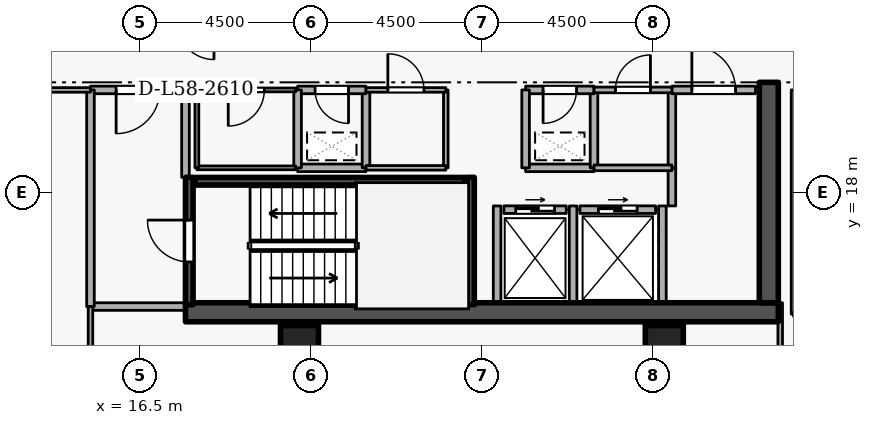
"""IFC4 building model, lengths in metres.
Left out: names, types, materials, properties, quantities, classifications, styles, units other than length and angle.
Written with IfcOpenShell. Run it as: python <this file> out.ifc"""

import sys

from ifc_helpers import new_model, si_unit, direction, frame, frame_2d, origin, origin_2d, place, context, subcontext, project, spatial, rectangle, extrude, element, fill, save


model = new_model("IFC4")
c1 = context("Model", 3, precision=1e-05, world=origin(), true_north=direction((0.0, 1.0)))
c2 = subcontext(c1, "Body", "Model", "MODEL_VIEW")
j1 = project(units=[si_unit("LENGTHUNIT", "METRE"), si_unit("PLANEANGLEUNIT", "RADIAN")], contexts=[c1])
p1 = place(None, origin())
s1 = spatial("IfcSite", under=j1, at=p1, CompositionType="ELEMENT")
p2 = place(p1, origin())
s2 = spatial("IfcBuilding", under=s1, at=p2, CompositionType="ELEMENT")
p3 = place(p2, frame((0.0, 0.0, 218.1)))
s3 = spatial("IfcBuildingStorey", under=s2, at=p3, CompositionType="ELEMENT", Elevation=218.1)
p4 = place(p3, frame((17.7, 14.85, 0.0), z_axis=(0.0, 0.0, 1.0), x_axis=(1.0, 0.0, 0.0)))
e1 = element("IfcWall", 1, at=p4, inside=s3, PredefinedType="SHEAR", context=c2, shape_type="SweptSolid", body=[
    extrude(rectangle(XDim=15.6, YDim=0.5, at=frame_2d((7.8, 0.0))), origin(), (0.0, 0.0, 1.0), 3.6),
])
p5 = place(p3, frame((33.05, 15.1, 0.0), z_axis=(0.0, 0.0, 1.0), x_axis=(0.0, 1.0, 0.0)))
e2 = element("IfcWall", 2, at=p5, inside=s3, PredefinedType="SHEAR", context=c2, shape_type="SweptSolid", body=[
    extrude(rectangle(XDim=5.8, YDim=0.5, at=frame_2d((2.9, 0.0))), origin(), (0.0, 0.0, 1.0), 3.6),
])
for number, where, z_axis, x_axis in (
    (3, (20.7, 14.0, 0.0), (0.0, 0.0, 1.0), (1.0, 0.0, 0.0)),
    (4, (30.3, 14.0, 0.0), (0.0, 0.0, 1.0), (1.0, 0.0, 0.0)),
):
    element("IfcColumn", number, at=place(p3, frame(where, z_axis=z_axis, x_axis=x_axis)), inside=s3, PredefinedType="COLUMN", context=c2, shape_type="SweptSolid", body=[
        extrude(rectangle(XDim=1.0, YDim=1.0, at=origin_2d()), origin(), (0.0, 0.0, 1.0), 3.6),
    ])
p6 = place(p3, frame((26.08, 17.55, 0.0), z_axis=(0.0, 0.0, 1.0), x_axis=(1.0, 0.0, 0.0)))
e5 = element("IfcWall", 5, at=p6, inside=s3, PredefinedType="STANDARD", context=c2, shape_type="SweptSolid", body=[
    extrude(rectangle(XDim=1.64, YDim=0.2, at=frame_2d((0.82, 0.0))), origin(), (0.0, 0.0, 1.0), 3.26),
])
p7 = place(p6, frame((0.31, 0.0, 0.0)))
e6 = element("IfcOpeningElement", 6, at=p7, cuts=e5, PredefinedType="OPENING", context=c2, shape_type="SweptSolid", body=[
    extrude(rectangle(XDim=1.02, YDim=2.06, at=frame_2d((0.51, 1.03))), frame((0.0, 0.11, 0.0), z_axis=(0.0, -1.0, 0.0), x_axis=(1.0, 0.0, 0.0)), (0.0, 0.0, 1.0), 0.22),
])
p8 = place(p3, frame((28.08, 17.55, 0.0), z_axis=(0.0, 0.0, 1.0), x_axis=(1.0, 0.0, 0.0)))
e7 = element("IfcWall", 7, at=p8, inside=s3, PredefinedType="STANDARD", context=c2, shape_type="SweptSolid", body=[
    extrude(rectangle(XDim=1.99, YDim=0.2, at=frame_2d((0.995, 0.0))), origin(), (0.0, 0.0, 1.0), 3.26),
])
p9 = place(p8, frame((0.485, 0.0, 0.0)))
e8 = element("IfcOpeningElement", 8, at=p9, cuts=e7, PredefinedType="OPENING", context=c2, shape_type="SweptSolid", body=[
    extrude(rectangle(XDim=1.02, YDim=2.06, at=frame_2d((0.51, 1.03))), frame((0.0, 0.11, 0.0), z_axis=(0.0, -1.0, 0.0), x_axis=(1.0, 0.0, 0.0)), (0.0, 0.0, 1.0), 0.22),
])
for number, where, z_axis, x_axis in (
    (9, (27.9, 15.112, 0.0), (0.0, 0.0, 1.0), (0.0, 1.0, 0.0)),
    (10, (25.9, 15.112, 0.0), (0.0, 0.0, 1.0), (0.0, 1.0, 0.0)),
    (11, (30.25, 15.112, 0.0), (0.0, 0.0, 1.0), (0.0, 1.0, 0.0)),
):
    element("IfcWall", number, at=place(p3, frame(where, z_axis=z_axis, x_axis=x_axis)), inside=s3, PredefinedType="STANDARD", context=c2, shape_type="SweptSolid", body=[
        extrude(rectangle(XDim=2.536, YDim=0.2, at=frame_2d((1.268, 0.0))), origin(), (0.0, 0.0, 1.0), 3.26),
    ])
p10 = place(p3, frame((17.8, 15.05, 0.0), z_axis=(0.0, 0.0, 1.0), x_axis=(0.0, 1.0, 0.0)))
e12 = element("IfcWall", 12, at=p10, inside=s3, PredefinedType="SHEAR", context=c2, shape_type="SweptSolid", body=[
    extrude(rectangle(XDim=3.35, YDim=0.2, at=frame_2d((1.675, 0.0))), origin(), (0.0, 0.0, 1.0), 3.6),
])
p11 = place(p10, frame((1.125, 0.0, 0.0)))
e13 = element("IfcOpeningElement", 13, at=p11, cuts=e12, PredefinedType="OPENING", context=c2, shape_type="SweptSolid", body=[
    extrude(rectangle(XDim=1.1, YDim=2.1, at=frame_2d((0.55, 1.05))), frame((0.0, 0.11, 0.0), z_axis=(0.0, -1.0, 0.0), x_axis=(1.0, 0.0, 0.0)), (0.0, 0.0, 1.0), 0.22),
])
p12 = place(p3, frame((25.2, 18.4, 0.0), z_axis=(0.0, 0.0, 1.0), x_axis=(0.0, -1.0, 0.0)))
e14 = element("IfcWall", 14, at=p12, inside=s3, PredefinedType="SHEAR", context=c2, shape_type="SweptSolid", body=[
    extrude(rectangle(XDim=3.35, YDim=0.2, at=frame_2d((1.675, 0.0))), origin(), (0.0, 0.0, 1.0), 3.6),
])
p13 = place(p3, frame((25.05, 18.297, 0.0), z_axis=(0.0, 0.0, 1.0), x_axis=(-1.0, 0.0, 0.0)))
e15 = element("IfcWall", 15, at=p13, inside=s3, PredefinedType="SHEAR", context=c2, shape_type="SweptSolid", body=[
    extrude(rectangle(XDim=7.1, YDim=0.2, at=frame_2d((3.55, 0.0))), origin(), (0.0, 0.0, 1.0), 3.6),
])
p14 = place(p3, frame((15.2, 15.0, 0.0), z_axis=(0.0, 0.0, 1.0), x_axis=(1.0, 0.0, 0.0)))
e16 = element("IfcWall", 16, at=p14, inside=s3, PredefinedType="STANDARD", context=c2, shape_type="SweptSolid", body=[
    extrude(rectangle(XDim=2.5, YDim=0.2, at=frame_2d((1.25, 0.0))), origin(), (0.0, 0.0, 1.0), 3.26),
])
p15 = place(p3, frame((17.7, 18.4, 0.0), z_axis=(0.0, 0.0, 1.0), x_axis=(0.0, 1.0, 0.0)))
e17 = element("IfcWall", 17, at=p15, inside=s3, PredefinedType="STANDARD", context=c2, shape_type="SweptSolid", body=[
    extrude(rectangle(XDim=2.3, YDim=0.2, at=frame_2d((1.15, 0.0))), origin(), (0.0, 0.0, 1.0), 2.465),
])
p16 = place(p3, frame((17.7, 20.7, 0.0), z_axis=(0.0, 0.0, 1.0), x_axis=(-1.0, 0.0, 0.0)))
e18 = element("IfcWall", 18, at=p16, inside=s3, PredefinedType="STANDARD", context=c2, shape_type="SweptSolid", body=[
    extrude(rectangle(XDim=2.5, YDim=0.2, at=frame_2d((1.25, 0.0))), origin(), (0.0, 0.0, 1.0), 3.26),
])
p17 = place(p16, frame((0.675, 0.0, 0.0)))
e19 = element("IfcOpeningElement", 19, at=p17, cuts=e18, PredefinedType="OPENING", context=c2, shape_type="SweptSolid", body=[
    extrude(rectangle(XDim=1.15, YDim=2.1, at=frame_2d((0.575, 1.05))), frame((0.0, 0.11, 0.0), z_axis=(0.0, -1.0, 0.0), x_axis=(1.0, 0.0, 0.0)), (0.0, 0.0, 1.0), 0.22),
])
p18 = place(p3, frame((15.2, 20.7, 0.0), z_axis=(0.0, 0.0, 1.0), x_axis=(0.0, -1.0, 0.0)))
e20 = element("IfcWall", 20, at=p18, inside=s3, PredefinedType="STANDARD", context=c2, shape_type="SweptSolid", body=[
    extrude(rectangle(XDim=5.7, YDim=0.2, at=frame_2d((2.85, 0.0))), origin(), (0.0, 0.0, 1.0), 3.26),
])
p19 = place(p3, frame((26.65, 18.65, 0.0), z_axis=(0.0, 0.0, 1.0), x_axis=(1.0, 0.0, 0.0)))
e21 = element("IfcWall", 21, at=p19, inside=s3, PredefinedType="STANDARD", context=c2, shape_type="SweptSolid", body=[
    extrude(rectangle(XDim=1.8, YDim=0.2, at=frame_2d((0.9, 0.0))), origin(), (0.0, 0.0, 1.0), 3.26),
])
p20 = place(p3, frame((28.45, 18.65, 0.0), z_axis=(0.0, 0.0, 1.0), x_axis=(0.0, 1.0, 0.0)))
e22 = element("IfcWall", 22, at=p20, inside=s3, PredefinedType="STANDARD", context=c2, shape_type="SweptSolid", body=[
    extrude(rectangle(XDim=2.05, YDim=0.2, at=frame_2d((1.025, 0.0))), origin(), (0.0, 0.0, 1.0), 3.26),
])
p21 = place(p3, frame((28.45, 20.7, 0.0), z_axis=(0.0, 0.0, 1.0), x_axis=(-1.0, 0.0, 0.0)))
e23 = element("IfcWall", 23, at=p21, inside=s3, PredefinedType="STANDARD", context=c2, shape_type="SweptSolid", body=[
    extrude(rectangle(XDim=1.8, YDim=0.2, at=frame_2d((0.9, 0.0))), origin(), (0.0, 0.0, 1.0), 3.26),
])
p22 = place(p21, frame((0.46, 0.0, 0.0)))
e24 = element("IfcOpeningElement", 24, at=p22, cuts=e23, PredefinedType="OPENING", context=c2, shape_type="SweptSolid", body=[
    extrude(rectangle(XDim=0.88, YDim=2.04, at=frame_2d((0.44, 1.02))), frame((0.0, 0.11, 0.0), z_axis=(0.0, -1.0, 0.0), x_axis=(1.0, 0.0, 0.0)), (0.0, 0.0, 1.0), 0.22),
])
p23 = place(p3, frame((26.65, 20.7, 0.0), z_axis=(0.0, 0.0, 1.0), x_axis=(0.0, -1.0, 0.0)))
e25 = element("IfcWall", 25, at=p23, inside=s3, PredefinedType="STANDARD", context=c2, shape_type="SweptSolid", body=[
    extrude(rectangle(XDim=2.05, YDim=0.2, at=frame_2d((1.025, 0.0))), origin(), (0.0, 0.0, 1.0), 3.26),
])
p24 = place(p3, frame((20.65, 18.65, 0.0), z_axis=(0.0, 0.0, 1.0), x_axis=(1.0, 0.0, 0.0)))
e26 = element("IfcWall", 26, at=p24, inside=s3, PredefinedType="STANDARD", context=c2, shape_type="SweptSolid", body=[
    extrude(rectangle(XDim=1.8, YDim=0.2, at=frame_2d((0.9, 0.0))), origin(), (0.0, 0.0, 1.0), 3.26),
])
p25 = place(p3, frame((22.45, 18.65, 0.0), z_axis=(0.0, 0.0, 1.0), x_axis=(0.0, 1.0, 0.0)))
e27 = element("IfcWall", 27, at=p25, inside=s3, PredefinedType="STANDARD", context=c2, shape_type="SweptSolid", body=[
    extrude(rectangle(XDim=2.05, YDim=0.2, at=frame_2d((1.025, 0.0))), origin(), (0.0, 0.0, 1.0), 3.26),
])
p26 = place(p3, frame((22.45, 20.7, 0.0), z_axis=(0.0, 0.0, 1.0), x_axis=(-1.0, 0.0, 0.0)))
e28 = element("IfcWall", 28, at=p26, inside=s3, PredefinedType="STANDARD", context=c2, shape_type="SweptSolid", body=[
    extrude(rectangle(XDim=1.8, YDim=0.2, at=frame_2d((0.9, 0.0))), origin(), (0.0, 0.0, 1.0), 3.26),
])
p27 = place(p26, frame((0.46, 0.0, 0.0)))
e29 = element("IfcOpeningElement", 29, at=p27, cuts=e28, PredefinedType="OPENING", context=c2, shape_type="SweptSolid", body=[
    extrude(rectangle(XDim=0.88, YDim=2.04, at=frame_2d((0.44, 1.02))), frame((0.0, 0.11, 0.0), z_axis=(0.0, -1.0, 0.0), x_axis=(1.0, 0.0, 0.0)), (0.0, 0.0, 1.0), 0.22),
])
p28 = place(p3, frame((20.65, 20.7, 0.0), z_axis=(0.0, 0.0, 1.0), x_axis=(0.0, -1.0, 0.0)))
e30 = element("IfcWall", 30, at=p28, inside=s3, PredefinedType="STANDARD", context=c2, shape_type="SweptSolid", body=[
    extrude(rectangle(XDim=2.05, YDim=0.2, at=frame_2d((1.025, 0.0))), origin(), (0.0, 0.0, 1.0), 3.26),
])
p29 = place(p3, frame((30.5, 17.648, 0.0), z_axis=(0.0, 0.0, 1.0), x_axis=(0.0, 1.0, 0.0)))
e31 = element("IfcWall", 31, at=p29, inside=s3, PredefinedType="STANDARD", context=c2, shape_type="SweptSolid", body=[
    extrude(rectangle(XDim=1.002, YDim=0.2, at=frame_2d((0.501, 0.0))), origin(), (0.0, 0.0, 1.0), 3.26),
])
p30 = place(p3, frame((30.5, 18.65, 0.0), z_axis=(0.0, 0.0, 1.0), x_axis=(0.0, 1.0, 0.0)))
e32 = element("IfcWall", 32, at=p30, inside=s3, PredefinedType="STANDARD", context=c2, shape_type="SweptSolid", body=[
    extrude(rectangle(XDim=2.05, YDim=0.2, at=frame_2d((1.025, 0.0))), origin(), (0.0, 0.0, 1.0), 3.26),
])
p31 = place(p3, frame((30.5, 20.7, 0.0), z_axis=(0.0, 0.0, 1.0), x_axis=(1.0, 0.0, 0.0)))
e33 = element("IfcWall", 33, at=p31, inside=s3, PredefinedType="STANDARD", context=c2, shape_type="SweptSolid", body=[
    extrude(rectangle(XDim=2.2, YDim=0.2, at=frame_2d((1.1, 0.0))), origin(), (0.0, 0.0, 1.0), 3.26),
])
p32 = place(p31, frame((0.525, 0.0, 0.0)))
e34 = element("IfcOpeningElement", 34, at=p32, cuts=e33, PredefinedType="OPENING", context=c2, shape_type="SweptSolid", body=[
    extrude(rectangle(XDim=1.15, YDim=2.1, at=frame_2d((0.575, 1.05))), frame((0.0, 0.11, 0.0), z_axis=(0.0, -1.0, 0.0), x_axis=(1.0, 0.0, 0.0)), (0.0, 0.0, 1.0), 0.22),
])
p33 = place(p3, frame((18.0, 18.65, 0.0), z_axis=(0.0, 0.0, 1.0), x_axis=(1.0, 0.0, 0.0)))
e35 = element("IfcWall", 35, at=p33, inside=s3, PredefinedType="PARTITIONING", context=c2, shape_type="SweptSolid", body=[
    extrude(rectangle(XDim=2.6, YDim=0.1, at=frame_2d((1.3, 0.0))), origin(), (0.0, 0.0, 1.0), 3.26),
])
p34 = place(p3, frame((20.6, 20.7, 0.0), z_axis=(0.0, 0.0, 1.0), x_axis=(-1.0, 0.0, 0.0)))
e36 = element("IfcWall", 36, at=p34, inside=s3, PredefinedType="PARTITIONING", context=c2, shape_type="SweptSolid", body=[
    extrude(rectangle(XDim=2.6, YDim=0.1, at=frame_2d((1.3, 0.0))), origin(), (0.0, 0.0, 1.0), 3.26),
])
p35 = place(p34, frame((0.825, 0.0, 0.0)))
e37 = element("IfcOpeningElement", 37, at=p35, cuts=e36, PredefinedType="OPENING", context=c2, shape_type="SweptSolid", body=[
    extrude(rectangle(XDim=0.95, YDim=2.1, at=frame_2d((0.475, 1.05))), frame((0.0, 0.06, 0.0), z_axis=(0.0, -1.0, 0.0), x_axis=(1.0, 0.0, 0.0)), (0.0, 0.0, 1.0), 0.12),
])
p36 = place(p3, frame((18.0, 20.7, 0.0), z_axis=(0.0, 0.0, 1.0), x_axis=(0.0, -1.0, 0.0)))
e38 = element("IfcWall", 38, at=p36, inside=s3, PredefinedType="PARTITIONING", context=c2, shape_type="SweptSolid", body=[
    extrude(rectangle(XDim=2.05, YDim=0.1, at=frame_2d((1.025, 0.0))), origin(), (0.0, 0.0, 1.0), 2.465),
])
p37 = place(p3, frame((24.55, 20.7, 0.0), z_axis=(0.0, 0.0, 1.0), x_axis=(0.0, -1.0, 0.0)))
e39 = element("IfcWall", 39, at=p37, inside=s3, PredefinedType="PARTITIONING", context=c2, shape_type="SweptSolid", body=[
    extrude(rectangle(XDim=2.05, YDim=0.12, at=frame_2d((1.025, 0.0))), origin(), (0.0, 0.0, 1.0), 3.26),
])
p38 = place(p3, frame((24.55, 18.65, 0.0), z_axis=(0.0, 0.0, 1.0), x_axis=(-1.0, 0.0, 0.0)))
e40 = element("IfcWall", 40, at=p38, inside=s3, PredefinedType="PARTITIONING", context=c2, shape_type="SweptSolid", body=[
    extrude(rectangle(XDim=2.1, YDim=0.12, at=frame_2d((1.05, 0.0))), origin(), (0.0, 0.0, 1.0), 3.26),
])
p39 = place(p3, frame((22.45, 20.7, 0.0), z_axis=(0.0, 0.0, 1.0), x_axis=(1.0, 0.0, 0.0)))
e41 = element("IfcWall", 41, at=p39, inside=s3, PredefinedType="PARTITIONING", context=c2, shape_type="SweptSolid", body=[
    extrude(rectangle(XDim=2.1, YDim=0.12, at=frame_2d((1.05, 0.0))), origin(), (0.0, 0.0, 1.0), 3.26),
])
p40 = place(p39, frame((0.575, 0.0, 0.0)))
e42 = element("IfcOpeningElement", 42, at=p40, cuts=e41, PredefinedType="OPENING", context=c2, shape_type="SweptSolid", body=[
    extrude(rectangle(XDim=0.95, YDim=2.1, at=frame_2d((0.475, 1.05))), frame((0.0, 0.07, 0.0), z_axis=(0.0, -1.0, 0.0), x_axis=(1.0, 0.0, 0.0)), (0.0, 0.0, 1.0), 0.14),
])
p41 = place(p3, frame((30.5, 18.65, 0.0), z_axis=(0.0, 0.0, 1.0), x_axis=(-1.0, 0.0, 0.0)))
e43 = element("IfcWall", 43, at=p41, inside=s3, PredefinedType="PARTITIONING", context=c2, shape_type="SweptSolid", body=[
    extrude(rectangle(XDim=2.05, YDim=0.15, at=frame_2d((1.025, 0.0))), origin(), (0.0, 0.0, 1.0), 3.26),
])
p42 = place(p3, frame((28.45, 20.7, 0.0), z_axis=(0.0, 0.0, 1.0), x_axis=(1.0, 0.0, 0.0)))
e44 = element("IfcWall", 44, at=p42, inside=s3, PredefinedType="PARTITIONING", context=c2, shape_type="SweptSolid", body=[
    extrude(rectangle(XDim=2.05, YDim=0.15, at=frame_2d((1.025, 0.0))), origin(), (0.0, 0.0, 1.0), 3.26),
])
p43 = place(p42, frame((0.565, 0.0, 0.0)))
e45 = element("IfcOpeningElement", 45, at=p43, cuts=e44, PredefinedType="OPENING", context=c2, shape_type="SweptSolid", body=[
    extrude(rectangle(XDim=0.92, YDim=2.08, at=frame_2d((0.46, 1.04))), frame((0.0, 0.085, 0.0), z_axis=(0.0, -1.0, 0.0), x_axis=(1.0, 0.0, 0.0)), (0.0, 0.0, 1.0), 0.17),
])
p44 = place(p3, frame((33.7, 20.7, 0.0), z_axis=(0.0, 0.0, 1.0), x_axis=(0.0, -1.0, 0.0)))
e46 = element("IfcWall", 46, at=p44, inside=s3, PredefinedType="PARTITIONING", context=c2, shape_type="SweptSolid", body=[
    extrude(rectangle(XDim=5.9, YDim=0.12, at=frame_2d((2.95, 0.0))), origin(), (0.0, 0.0, 1.0), 3.26),
])
p45 = place(p3, frame((33.35, 9.28, 0.0), z_axis=(0.0, 0.0, 1.0), x_axis=(0.0, 1.0, 0.0)))
e47 = element("IfcWall", 47, at=p45, inside=s3, PredefinedType="PARTITIONING", context=c2, shape_type="SweptSolid", body=[
    extrude(rectangle(XDim=5.82, YDim=0.12, at=frame_2d((2.91, 0.0))), origin(), (0.0, 0.0, 1.0), 2.465),
])
p46 = place(p3, frame((13.25, 20.7, 0.0), z_axis=(0.0, 0.0, 1.0), x_axis=(1.0, 0.0, 0.0)))
e48 = element("IfcWall", 48, at=p46, inside=s3, PredefinedType="PARTITIONING", context=c2, shape_type="SweptSolid", body=[
    extrude(rectangle(XDim=1.95, YDim=0.12, at=frame_2d((0.975, 0.0))), origin(), (0.0, 0.0, 1.0), 3.26),
])
p47 = place(p3, frame((15.2, 15.0, 0.0), z_axis=(0.0, 0.0, 1.0), x_axis=(0.0, -1.0, 0.0)))
e49 = element("IfcWall", 49, at=p47, inside=s3, PredefinedType="PARTITIONING", context=c2, shape_type="SweptSolid", body=[
    extrude(rectangle(XDim=5.72, YDim=0.12, at=frame_2d((2.86, 0.0))), origin(), (0.0, 0.0, 1.0), 3.26),
])
p48 = place(p7, origin())
e50 = element("IfcDoor", 50, at=p48, inside=s3, OperationType="SLIDING_TO_LEFT", PredefinedType="DOOR", context=c2, shape_type="SweptSolid", body=[
    extrude(rectangle(XDim=1.02, YDim=2.06, at=frame_2d((0.51, 1.03))), frame((0.0, 0.025, 0.0), z_axis=(0.0, -1.0, 0.0), x_axis=(1.0, 0.0, 0.0)), (0.0, 0.0, 1.0), 0.05),
])
fill(e6, e50)
p49 = place(p9, origin())
e51 = element("IfcDoor", 51, at=p49, inside=s3, OperationType="SLIDING_TO_LEFT", PredefinedType="DOOR", context=c2, shape_type="SweptSolid", body=[
    extrude(rectangle(XDim=1.02, YDim=2.06, at=frame_2d((0.51, 1.03))), frame((0.0, 0.025, 0.0), z_axis=(0.0, -1.0, 0.0), x_axis=(1.0, 0.0, 0.0)), (0.0, 0.0, 1.0), 0.05),
])
fill(e8, e51)
p50 = place(p11, origin())
e52 = element("IfcDoor", 52, at=p50, inside=s3, OperationType="SINGLE_SWING_RIGHT", PredefinedType="DOOR", context=c2, shape_type="SweptSolid", body=[
    extrude(rectangle(XDim=1.1, YDim=2.1, at=frame_2d((0.55, 1.05))), frame((0.0, 0.025, 0.0), z_axis=(0.0, -1.0, 0.0), x_axis=(1.0, 0.0, 0.0)), (0.0, 0.0, 1.0), 0.05),
])
fill(e13, e52)
p51 = place(p17, origin())
e53 = element("IfcDoor", 53, at=p51, inside=s3, OperationType="SINGLE_SWING_RIGHT", PredefinedType="DOOR", context=c2, shape_type="SweptSolid", body=[
    extrude(rectangle(XDim=1.15, YDim=2.1, at=frame_2d((0.575, 1.05))), frame((0.0, 0.025, 0.0), z_axis=(0.0, -1.0, 0.0), x_axis=(1.0, 0.0, 0.0)), (0.0, 0.0, 1.0), 0.05),
])
fill(e19, e53)
p52 = place(p22, origin())
e54 = element("IfcDoor", 54, at=p52, inside=s3, OperationType="SINGLE_SWING_RIGHT", PredefinedType="DOOR", context=c2, shape_type="SweptSolid", body=[
    extrude(rectangle(XDim=0.88, YDim=2.04, at=frame_2d((0.44, 1.02))), frame((0.0, 0.025, 0.0), z_axis=(0.0, -1.0, 0.0), x_axis=(1.0, 0.0, 0.0)), (0.0, 0.0, 1.0), 0.05),
])
fill(e24, e54)
p53 = place(p27, origin())
e55 = element("IfcDoor", 55, at=p53, inside=s3, OperationType="SINGLE_SWING_LEFT", PredefinedType="DOOR", context=c2, shape_type="SweptSolid", body=[
    extrude(rectangle(XDim=0.88, YDim=2.04, at=frame_2d((0.44, 1.02))), frame((0.0, 0.025, 0.0), z_axis=(0.0, -1.0, 0.0), x_axis=(1.0, 0.0, 0.0)), (0.0, 0.0, 1.0), 0.05),
])
fill(e29, e55)
p54 = place(p35, origin())
e56 = element("IfcDoor", 56, at=p54, inside=s3, OperationType="SINGLE_SWING_RIGHT", PredefinedType="DOOR", context=c2, shape_type="SweptSolid", body=[
    extrude(rectangle(XDim=0.95, YDim=2.1, at=frame_2d((0.475, 1.05))), frame((0.0, 0.025, 0.0), z_axis=(0.0, -1.0, 0.0), x_axis=(1.0, 0.0, 0.0)), (0.0, 0.0, 1.0), 0.05),
])
fill(e37, e56)
p55 = place(p40, origin())
e57 = element("IfcDoor", 57, at=p55, inside=s3, OperationType="SINGLE_SWING_LEFT", PredefinedType="DOOR", context=c2, shape_type="SweptSolid", body=[
    extrude(rectangle(XDim=0.95, YDim=2.1, at=frame_2d((0.475, 1.05))), frame((0.0, 0.025, 0.0), z_axis=(0.0, -1.0, 0.0), x_axis=(1.0, 0.0, 0.0)), (0.0, 0.0, 1.0), 0.05),
])
fill(e42, e57)
p56 = place(p43, origin())
e58 = element("IfcDoor", 58, at=p56, inside=s3, OperationType="SINGLE_SWING_RIGHT", PredefinedType="DOOR", context=c2, shape_type="SweptSolid", body=[
    extrude(rectangle(XDim=0.92, YDim=2.08, at=frame_2d((0.46, 1.04))), frame((0.0, 0.025, 0.0), z_axis=(0.0, -1.0, 0.0), x_axis=(1.0, 0.0, 0.0)), (0.0, 0.0, 1.0), 0.05),
])
fill(e45, e58)
p57 = place(p32, origin())
e59 = element("IfcDoor", 59, at=p57, inside=s3, OperationType="SINGLE_SWING_LEFT", PredefinedType="DOOR", context=c2, shape_type="SweptSolid", body=[
    extrude(rectangle(XDim=1.15, YDim=2.1, at=frame_2d((0.575, 1.05))), frame((0.0, 0.025, 0.0), z_axis=(0.0, -1.0, 0.0), x_axis=(1.0, 0.0, 0.0)), (0.0, 0.0, 1.0), 0.05),
])
fill(e34, e59)
save(model, sys.argv[1])
